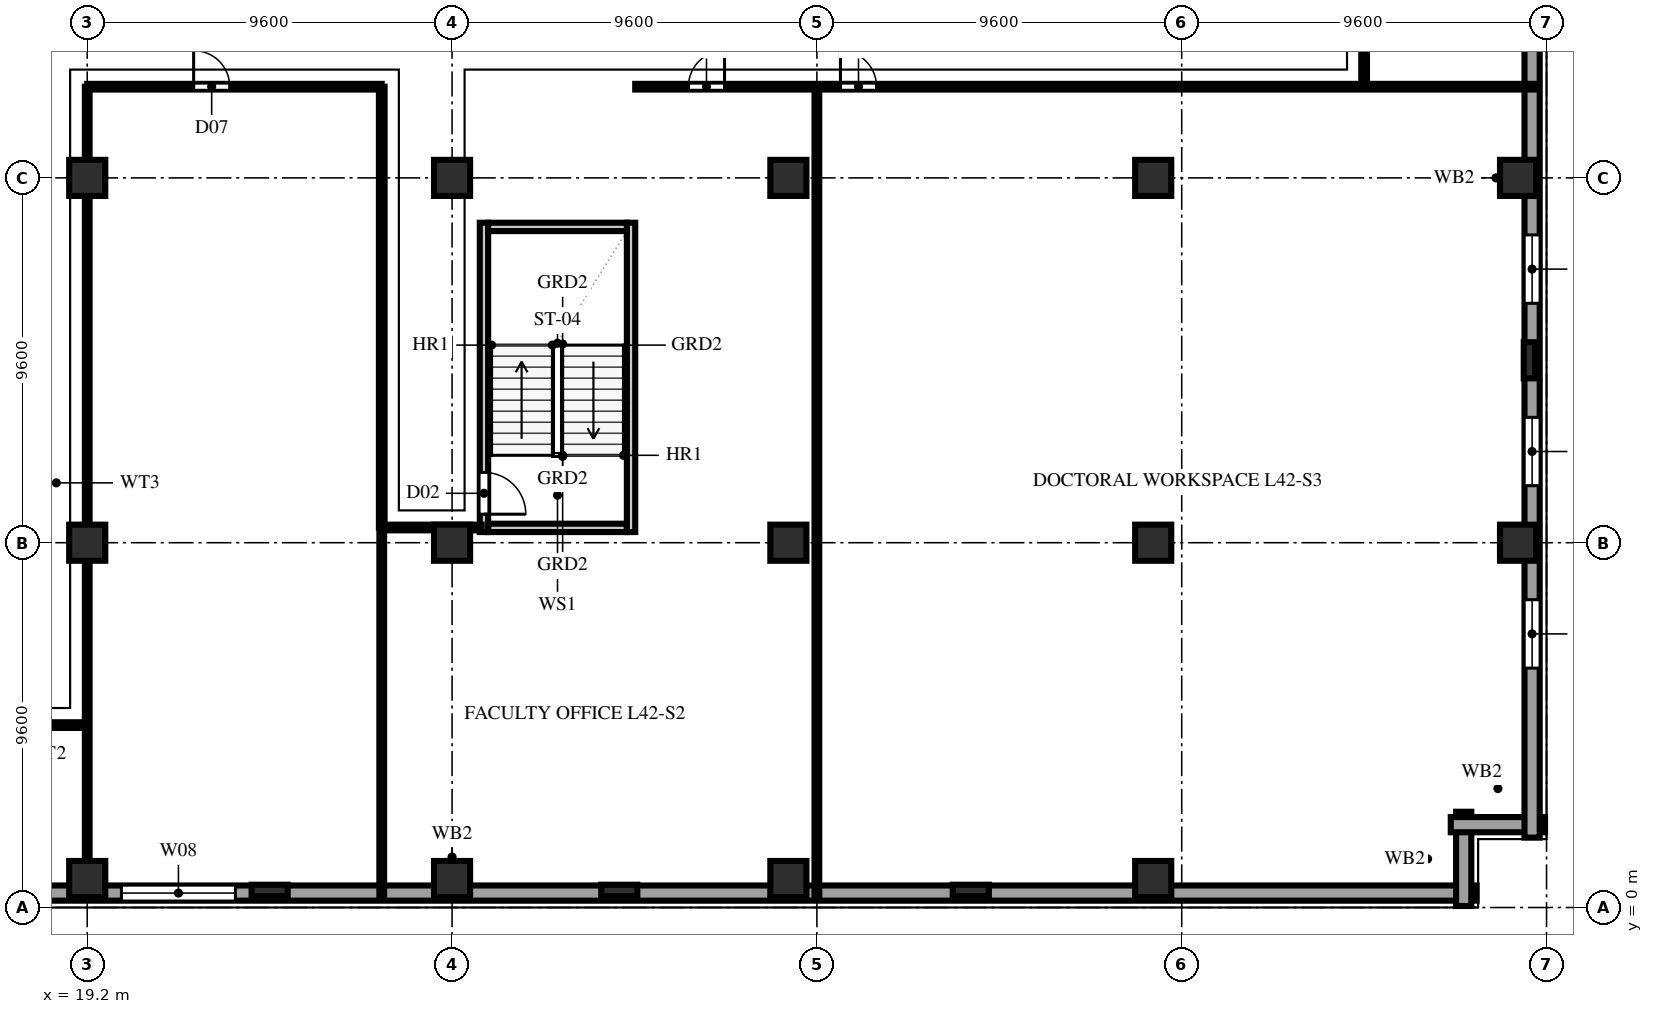
"""IFC4 building model, lengths in metres.
Left out: names, types, materials, properties, quantities, classifications, styles, units other than length and angle.
Written with IfcOpenShell. Run it as: python <this file> out.ifc"""

import sys

from ifc_helpers import new_model, si_unit, direction, frame, frame_2d, origin, origin_2d, place, context, subcontext, project, spatial, rectangle, extrude, element, fill, save


model = new_model("IFC4")
c1 = context("Model", 3, precision=1e-05, world=origin(), true_north=direction((0.0, 1.0)))
c2 = subcontext(c1, "Body", "Model", "MODEL_VIEW")
j1 = project(units=[si_unit("LENGTHUNIT", "METRE"), si_unit("PLANEANGLEUNIT", "RADIAN")], contexts=[c1])
p1 = place(None, origin())
s1 = spatial("IfcSite", under=j1, at=p1, CompositionType="ELEMENT")
p2 = place(p1, origin())
s2 = spatial("IfcBuilding", under=s1, at=p2, CompositionType="ELEMENT")
p3 = place(p2, frame((0.0, 0.0, 167.4)))
s3 = spatial("IfcBuildingStorey", under=s2, at=p3, CompositionType="ELEMENT", Elevation=167.4)
for number, where, z_axis, x_axis in (
    (1, (19.2, 0.75, 0.0), (0.0, 0.0, 1.0), (1.0, 0.0, 0.0)),
    (2, (19.2, 9.6, 0.0), (0.0, 0.0, 1.0), (1.0, 0.0, 0.0)),
    (3, (19.2, 19.2, 0.0), (0.0, 0.0, 1.0), (1.0, 0.0, 0.0)),
    (4, (28.8, 0.75, 0.0), (0.0, 0.0, 1.0), (1.0, 0.0, 0.0)),
    (5, (28.8, 9.6, 0.0), (0.0, 0.0, 1.0), (1.0, 0.0, 0.0)),
    (6, (28.8, 19.2, 0.0), (0.0, 0.0, 1.0), (1.0, 0.0, 0.0)),
    (7, (37.65, 0.75, 0.0), (0.0, 0.0, 1.0), (1.0, 0.0, 0.0)),
    (8, (37.65, 9.6, 0.0), (0.0, 0.0, 1.0), (1.0, 0.0, 0.0)),
    (9, (37.65, 19.2, 0.0), (0.0, 0.0, 1.0), (1.0, 0.0, 0.0)),
    (10, (47.25, 0.75, 0.0), (0.0, 0.0, 1.0), (1.0, 0.0, 0.0)),
    (11, (47.25, 9.6, 0.0), (0.0, 0.0, 1.0), (1.0, 0.0, 0.0)),
    (12, (47.25, 19.2, 0.0), (0.0, 0.0, 1.0), (1.0, 0.0, 0.0)),
    (13, (56.85, 9.6, 0.0), (0.0, 0.0, 1.0), (1.0, 0.0, 0.0)),
    (14, (56.85, 19.2, 0.0), (0.0, 0.0, 1.0), (1.0, 0.0, 0.0)),
):
    element("IfcColumn", number, at=place(p3, frame(where, z_axis=z_axis, x_axis=x_axis)), inside=s3, PredefinedType="COLUMN", context=c2, shape_type="SweptSolid", body=[
        extrude(rectangle(XDim=0.95, YDim=0.95, at=origin_2d()), origin(), (0.0, 0.0, 1.0), 3.8),
    ])
for number, where, z_axis, x_axis in (
    (15, (24.0, 0.45, 0.0), (0.0, 0.0, 1.0), (1.0, 0.0, 0.0)),
    (16, (33.2, 0.45, 0.0), (0.0, 0.0, 1.0), (1.0, 0.0, 0.0)),
    (17, (42.45, 0.45, 0.0), (0.0, 0.0, 1.0), (1.0, 0.0, 0.0)),
    (18, (57.15, 14.4, 0.0), (0.0, 0.0, 1.0), (0.0, 1.0, 0.0)),
):
    element("IfcColumn", number, at=place(p3, frame(where, z_axis=z_axis, x_axis=x_axis)), inside=s3, PredefinedType="PILASTER", context=c2, shape_type="SweptSolid", body=[
        extrude(rectangle(XDim=0.95, YDim=0.3, at=origin_2d()), origin(), (0.0, 0.0, 1.0), 3.8),
    ])
p4 = place(p3, frame((1.84, 0.38, 0.0), z_axis=(0.0, 0.0, 1.0), x_axis=(1.0, 0.0, 0.0)))
e19 = element("IfcWall", 19, at=p4, inside=s3, PredefinedType="SOLIDWALL", context=c2, shape_type="SweptSolid", body=[
    extrude(rectangle(XDim=53.92, YDim=0.4, at=frame_2d((26.96, 0.0))), origin(), (0.0, 0.0, 1.0), 3.54),
])
p5 = place(p4, frame((3.86, 0.0, 0.75)))
e20 = element("IfcOpeningElement", 20, at=p5, cuts=e19, PredefinedType="OPENING", context=c2, shape_type="SweptSolid", body=[
    extrude(rectangle(XDim=3.0, YDim=1.9, at=frame_2d((1.5, 0.95))), frame((0.0, 0.212, 0.0), z_axis=(0.0, -1.0, 0.0), x_axis=(1.0, 0.0, 0.0)), (0.0, 0.0, 1.0), 0.424),
])
p6 = place(p4, frame((8.66, 0.0, 0.75)))
e21 = element("IfcOpeningElement", 21, at=p6, cuts=e19, PredefinedType="OPENING", context=c2, shape_type="SweptSolid", body=[
    extrude(rectangle(XDim=3.0, YDim=1.9, at=frame_2d((1.5, 0.95))), frame((0.0, 0.212, 0.0), z_axis=(0.0, -1.0, 0.0), x_axis=(1.0, 0.0, 0.0)), (0.0, 0.0, 1.0), 0.424),
])
p7 = place(p4, frame((18.26, 0.0, 0.75)))
e22 = element("IfcOpeningElement", 22, at=p7, cuts=e19, PredefinedType="OPENING", context=c2, shape_type="SweptSolid", body=[
    extrude(rectangle(XDim=3.0, YDim=1.9, at=frame_2d((1.5, 0.95))), frame((0.0, 0.212, 0.0), z_axis=(0.0, -1.0, 0.0), x_axis=(1.0, 0.0, 0.0)), (0.0, 0.0, 1.0), 0.424),
])
for number, where, z_axis, x_axis in (
    (23, (55.42, 0.04, 0.0), (0.0, 0.0, 1.0), (0.0, 1.0, 0.0)),
    (24, (55.08, 2.18, 0.0), (0.0, 0.0, 1.0), (1.0, 0.0, 0.0)),
):
    element("IfcWall", number, at=place(p3, frame(where, z_axis=z_axis, x_axis=x_axis)), inside=s3, PredefinedType="SOLIDWALL", context=c2, shape_type="SweptSolid", body=[
        extrude(rectangle(XDim=2.48, YDim=0.4, at=frame_2d((1.24, 0.0))), origin(), (0.0, 0.0, 1.0), 3.54),
    ])
p8 = place(p3, frame((57.22, 1.84, 0.0), z_axis=(0.0, 0.0, 1.0), x_axis=(0.0, 1.0, 0.0)))
e25 = element("IfcWall", 25, at=p8, inside=s3, PredefinedType="SOLIDWALL", context=c2, shape_type="SweptSolid", body=[
    extrude(rectangle(XDim=34.72, YDim=0.4, at=frame_2d((17.36, 0.0))), origin(), (0.0, 0.0, 1.0), 3.54),
])
p9 = place(p8, frame((4.46, 0.0, 0.85)))
e26 = element("IfcOpeningElement", 26, at=p9, cuts=e25, PredefinedType="OPENING", context=c2, shape_type="SweptSolid", body=[
    extrude(rectangle(XDim=1.8, YDim=1.85, at=frame_2d((0.9, 0.925))), frame((0.0, 0.212, 0.0), z_axis=(0.0, -1.0, 0.0), x_axis=(1.0, 0.0, 0.0)), (0.0, 0.0, 1.0), 0.424),
])
p10 = place(p8, frame((9.26, 0.0, 0.85)))
e27 = element("IfcOpeningElement", 27, at=p10, cuts=e25, PredefinedType="OPENING", context=c2, shape_type="SweptSolid", body=[
    extrude(rectangle(XDim=1.8, YDim=1.85, at=frame_2d((0.9, 0.925))), frame((0.0, 0.212, 0.0), z_axis=(0.0, -1.0, 0.0), x_axis=(1.0, 0.0, 0.0)), (0.0, 0.0, 1.0), 0.424),
])
p11 = place(p8, frame((14.06, 0.0, 0.85)))
e28 = element("IfcOpeningElement", 28, at=p11, cuts=e25, PredefinedType="OPENING", context=c2, shape_type="SweptSolid", body=[
    extrude(rectangle(XDim=1.8, YDim=1.85, at=frame_2d((0.9, 0.925))), frame((0.0, 0.212, 0.0), z_axis=(0.0, -1.0, 0.0), x_axis=(1.0, 0.0, 0.0)), (0.0, 0.0, 1.0), 0.424),
])
p12 = place(p8, frame((23.66, 0.0, 0.85)))
e29 = element("IfcOpeningElement", 29, at=p12, cuts=e25, PredefinedType="OPENING", context=c2, shape_type="SweptSolid", body=[
    extrude(rectangle(XDim=1.8, YDim=1.85, at=frame_2d((0.9, 0.925))), frame((0.0, 0.212, 0.0), z_axis=(0.0, -1.0, 0.0), x_axis=(1.0, 0.0, 0.0)), (0.0, 0.0, 1.0), 0.424),
])
p13 = place(p8, frame((28.46, 0.0, 0.85)))
e30 = element("IfcOpeningElement", 30, at=p13, cuts=e25, PredefinedType="OPENING", context=c2, shape_type="SweptSolid", body=[
    extrude(rectangle(XDim=1.8, YDim=1.85, at=frame_2d((0.9, 0.925))), frame((0.0, 0.212, 0.0), z_axis=(0.0, -1.0, 0.0), x_axis=(1.0, 0.0, 0.0)), (0.0, 0.0, 1.0), 0.424),
])
p14 = place(p3, frame((29.75, 9.99, 0.0), z_axis=(0.0, 0.0, 1.0), x_axis=(1.0, 0.0, 0.0)))
e31 = element("IfcWall", 31, at=p14, inside=s3, PredefinedType="SOLIDWALL", context=c2, shape_type="SweptSolid", body=[
    extrude(rectangle(XDim=3.65, YDim=0.22, at=frame_2d((1.825, 0.0))), origin(), (0.0, 0.0, 1.0), 3.54),
])
p15 = place(p3, frame((29.64, 9.88, 0.0), z_axis=(0.0, 0.0, 1.0), x_axis=(0.0, 1.0, 0.0)))
e32 = element("IfcWall", 32, at=p15, inside=s3, PredefinedType="SOLIDWALL", context=c2, shape_type="SweptSolid", body=[
    extrude(rectangle(XDim=8.14, YDim=0.22, at=frame_2d((4.07, 0.0))), origin(), (0.0, 0.0, 1.0), 3.54),
])
p16 = place(p15, frame((0.47, 0.0, 0.0)))
e33 = element("IfcOpeningElement", 33, at=p16, cuts=e32, PredefinedType="OPENING", context=c2, shape_type="SweptSolid", body=[
    extrude(rectangle(XDim=1.1, YDim=2.2, at=frame_2d((0.55, 1.1))), frame((0.0, 0.122, 0.0), z_axis=(0.0, -1.0, 0.0), x_axis=(1.0, 0.0, 0.0)), (0.0, 0.0, 1.0), 0.244),
])
p17 = place(p3, frame((33.51, 9.88, 0.0), z_axis=(0.0, 0.0, 1.0), x_axis=(0.0, 1.0, 0.0)))
e34 = element("IfcWall", 34, at=p17, inside=s3, PredefinedType="SOLIDWALL", context=c2, shape_type="SweptSolid", body=[
    extrude(rectangle(XDim=8.14, YDim=0.22, at=frame_2d((4.07, 0.0))), origin(), (0.0, 0.0, 1.0), 3.54),
])
p18 = place(p3, frame((29.75, 17.91, 0.0), z_axis=(0.0, 0.0, 1.0), x_axis=(1.0, 0.0, 0.0)))
e35 = element("IfcWall", 35, at=p18, inside=s3, PredefinedType="SOLIDWALL", context=c2, shape_type="SweptSolid", body=[
    extrude(rectangle(XDim=3.65, YDim=0.22, at=frame_2d((1.825, 0.0))), origin(), (0.0, 0.0, 1.0), 3.54),
])
p19 = place(p3, frame((17.05, 4.8, 0.0), z_axis=(0.0, 0.0, 1.0), x_axis=(1.0, 0.0, 0.0)))
e36 = element("IfcWall", 36, at=p19, inside=s3, PredefinedType="PARTITIONING", context=c2, shape_type="SweptSolid", body=[
    extrude(rectangle(XDim=2.15, YDim=0.15, at=frame_2d((1.075, 0.0))), origin(), (0.0, 0.0, 1.0), 3.54),
])
p20 = place(p3, frame((52.8, 21.6, 0.0), z_axis=(0.0, 0.0, 1.0), x_axis=(0.0, 1.0, 0.0)))
e37 = element("IfcWall", 37, at=p20, inside=s3, PredefinedType="PARTITIONING", context=c2, shape_type="SweptSolid", body=[
    extrude(rectangle(XDim=2.1, YDim=0.15, at=frame_2d((1.05, 0.0))), origin(), (0.0, 0.0, 1.0), 3.54),
])
p21 = place(p3, frame((19.2, 0.22, 0.0), z_axis=(0.0, 0.0, 1.0), x_axis=(0.0, 1.0, 0.0)))
e38 = element("IfcWall", 38, at=p21, inside=s3, PredefinedType="PARTITIONING", context=c2, shape_type="SweptSolid", body=[
    extrude(rectangle(XDim=0.53, YDim=0.125, at=frame_2d((0.265, 0.0))), origin(), (0.0, 0.0, 1.0), 3.54),
])
p22 = place(p3, frame((19.2, 0.75, 0.0), z_axis=(0.0, 0.0, 1.0), x_axis=(0.0, 1.0, 0.0)))
e39 = element("IfcWall", 39, at=p22, inside=s3, PredefinedType="PARTITIONING", context=c2, shape_type="SweptSolid", body=[
    extrude(rectangle(XDim=20.85, YDim=0.125, at=frame_2d((10.425, 0.0))), origin(), (0.0, 0.0, 1.0), 2.845),
])
p23 = place(p3, frame((19.2, 21.6, 0.0), z_axis=(0.0, 0.0, 1.0), x_axis=(1.0, 0.0, 0.0)))
e40 = element("IfcWall", 40, at=p23, inside=s3, PredefinedType="PARTITIONING", context=c2, shape_type="SweptSolid", body=[
    extrude(rectangle(XDim=7.75, YDim=0.15, at=frame_2d((3.875, 0.0))), origin(), (0.0, 0.0, 1.0), 3.54),
])
p24 = place(p23, frame((2.8, 0.0, 0.0)))
e41 = element("IfcOpeningElement", 41, at=p24, cuts=e40, PredefinedType="OPENING", context=c2, shape_type="SweptSolid", body=[
    extrude(rectangle(XDim=0.95, YDim=2.15, at=frame_2d((0.475, 1.075))), frame((0.0, 0.087, 0.0), z_axis=(0.0, -1.0, 0.0), x_axis=(1.0, 0.0, 0.0)), (0.0, 0.0, 1.0), 0.174),
])
p25 = place(p3, frame((26.95, 0.22, 0.0), z_axis=(0.0, 0.0, 1.0), x_axis=(0.0, 1.0, 0.0)))
e42 = element("IfcWall", 42, at=p25, inside=s3, PredefinedType="PARTITIONING", context=c2, shape_type="SweptSolid", body=[
    extrude(rectangle(XDim=9.78, YDim=0.125, at=frame_2d((4.89, 0.0))), origin(), (0.0, 0.0, 1.0), 3.54),
])
p26 = place(p3, frame((26.95, 10.0, 0.0), z_axis=(0.0, 0.0, 1.0), x_axis=(0.0, 1.0, 0.0)))
e43 = element("IfcWall", 43, at=p26, inside=s3, PredefinedType="PARTITIONING", context=c2, shape_type="SweptSolid", body=[
    extrude(rectangle(XDim=11.6, YDim=0.15, at=frame_2d((5.8, 0.0))), origin(), (0.0, 0.0, 1.0), 3.54),
])
p27 = place(p3, frame((26.95, 10.0, 0.0), z_axis=(0.0, 0.0, 1.0), x_axis=(1.0, 0.0, 0.0)))
e44 = element("IfcWall", 44, at=p27, inside=s3, PredefinedType="PARTITIONING", context=c2, shape_type="SweptSolid", body=[
    extrude(rectangle(XDim=2.63, YDim=0.15, at=frame_2d((1.315, 0.0))), origin(), (0.0, 0.0, 1.0), 3.54),
])
p28 = place(p3, frame((38.4, 0.22, 0.0), z_axis=(0.0, 0.0, 1.0), x_axis=(0.0, 1.0, 0.0)))
e45 = element("IfcWall", 45, at=p28, inside=s3, PredefinedType="PARTITIONING", context=c2, shape_type="SweptSolid", body=[
    extrude(rectangle(XDim=21.38, YDim=0.125, at=frame_2d((10.69, 0.0))), origin(), (0.0, 0.0, 1.0), 3.54),
])
p29 = place(p3, frame((33.62, 21.6, 0.0), z_axis=(0.0, 0.0, 1.0), x_axis=(1.0, 0.0, 0.0)))
e46 = element("IfcWall", 46, at=p29, inside=s3, PredefinedType="PARTITIONING", context=c2, shape_type="SweptSolid", body=[
    extrude(rectangle(XDim=23.76, YDim=0.15, at=frame_2d((11.88, 0.0))), origin(), (0.0, 0.0, 1.0), 3.54),
])
p30 = place(p29, frame((1.4, 0.0, 0.0)))
e47 = element("IfcOpeningElement", 47, at=p30, cuts=e46, PredefinedType="OPENING", context=c2, shape_type="SweptSolid", body=[
    extrude(rectangle(XDim=0.95, YDim=2.15, at=frame_2d((0.475, 1.075))), frame((0.0, 0.087, 0.0), z_axis=(0.0, -1.0, 0.0), x_axis=(1.0, 0.0, 0.0)), (0.0, 0.0, 1.0), 0.174),
])
p31 = place(p29, frame((5.4, 0.0, 0.0)))
e48 = element("IfcOpeningElement", 48, at=p31, cuts=e46, PredefinedType="OPENING", context=c2, shape_type="SweptSolid", body=[
    extrude(rectangle(XDim=0.95, YDim=2.15, at=frame_2d((0.475, 1.075))), frame((0.0, 0.087, 0.0), z_axis=(0.0, -1.0, 0.0), x_axis=(1.0, 0.0, 0.0)), (0.0, 0.0, 1.0), 0.174),
])
p32 = place(p7, origin())
e49 = element("IfcWindow", 49, at=p32, inside=s3, PartitioningType="TRIPLE_PANEL_VERTICAL", PredefinedType="WINDOW", context=c2, shape_type="SweptSolid", body=[
    extrude(rectangle(XDim=3.0, YDim=1.9, at=frame_2d((1.5, 0.95))), frame((0.0, 0.11, 0.0), z_axis=(0.0, -1.0, 0.0), x_axis=(1.0, 0.0, 0.0)), (0.0, 0.0, 1.0), 0.06),
])
fill(e22, e49)
p33 = place(p9, origin())
e50 = element("IfcWindow", 50, at=p33, inside=s3, PartitioningType="DOUBLE_PANEL_VERTICAL", PredefinedType="WINDOW", context=c2, shape_type="SweptSolid", body=[
    extrude(rectangle(XDim=1.8, YDim=1.85, at=frame_2d((0.9, 0.925))), frame((0.0, 0.11, 0.0), z_axis=(0.0, -1.0, 0.0), x_axis=(1.0, 0.0, 0.0)), (0.0, 0.0, 1.0), 0.06),
])
fill(e26, e50)
p34 = place(p10, origin())
e51 = element("IfcWindow", 51, at=p34, inside=s3, PartitioningType="DOUBLE_PANEL_VERTICAL", PredefinedType="WINDOW", context=c2, shape_type="SweptSolid", body=[
    extrude(rectangle(XDim=1.8, YDim=1.85, at=frame_2d((0.9, 0.925))), frame((0.0, 0.11, 0.0), z_axis=(0.0, -1.0, 0.0), x_axis=(1.0, 0.0, 0.0)), (0.0, 0.0, 1.0), 0.06),
])
fill(e27, e51)
p35 = place(p11, origin())
e52 = element("IfcWindow", 52, at=p35, inside=s3, PartitioningType="DOUBLE_PANEL_VERTICAL", PredefinedType="WINDOW", context=c2, shape_type="SweptSolid", body=[
    extrude(rectangle(XDim=1.8, YDim=1.85, at=frame_2d((0.9, 0.925))), frame((0.0, 0.11, 0.0), z_axis=(0.0, -1.0, 0.0), x_axis=(1.0, 0.0, 0.0)), (0.0, 0.0, 1.0), 0.06),
])
fill(e28, e52)
p36 = place(p16, frame((1.1, 0.0, 0.0), z_axis=(0.0, 0.0, 1.0), x_axis=(-1.0, 0.0, 0.0)))
e53 = element("IfcDoor", 53, at=p36, inside=s3, OperationType="SINGLE_SWING_RIGHT", PredefinedType="DOOR", context=c2, shape_type="SweptSolid", body=[
    extrude(rectangle(XDim=1.1, YDim=2.2, at=frame_2d((0.55, 1.1))), frame((0.0, 0.025, 0.0), z_axis=(0.0, -1.0, 0.0), x_axis=(1.0, 0.0, 0.0)), (0.0, 0.0, 1.0), 0.05),
])
fill(e33, e53)
p37 = place(p24, origin())
e54 = element("IfcDoor", 54, at=p37, inside=s3, OperationType="SINGLE_SWING_LEFT", PredefinedType="DOOR", context=c2, shape_type="SweptSolid", body=[
    extrude(rectangle(XDim=0.95, YDim=2.15, at=frame_2d((0.475, 1.075))), frame((0.0, 0.025, 0.0), z_axis=(0.0, -1.0, 0.0), x_axis=(1.0, 0.0, 0.0)), (0.0, 0.0, 1.0), 0.05),
])
fill(e41, e54)
p38 = place(p30, origin())
e55 = element("IfcDoor", 55, at=p38, inside=s3, OperationType="SINGLE_SWING_RIGHT", PredefinedType="DOOR", context=c2, shape_type="SweptSolid", body=[
    extrude(rectangle(XDim=0.95, YDim=2.15, at=frame_2d((0.475, 1.075))), frame((0.0, 0.025, 0.0), z_axis=(0.0, -1.0, 0.0), x_axis=(1.0, 0.0, 0.0)), (0.0, 0.0, 1.0), 0.05),
])
fill(e47, e55)
p39 = place(p31, origin())
e56 = element("IfcDoor", 56, at=p39, inside=s3, OperationType="SINGLE_SWING_LEFT", PredefinedType="DOOR", context=c2, shape_type="SweptSolid", body=[
    extrude(rectangle(XDim=0.95, YDim=2.15, at=frame_2d((0.475, 1.075))), frame((0.0, 0.025, 0.0), z_axis=(0.0, -1.0, 0.0), x_axis=(1.0, 0.0, 0.0)), (0.0, 0.0, 1.0), 0.05),
])
fill(e48, e56)
save(model, sys.argv[1])
